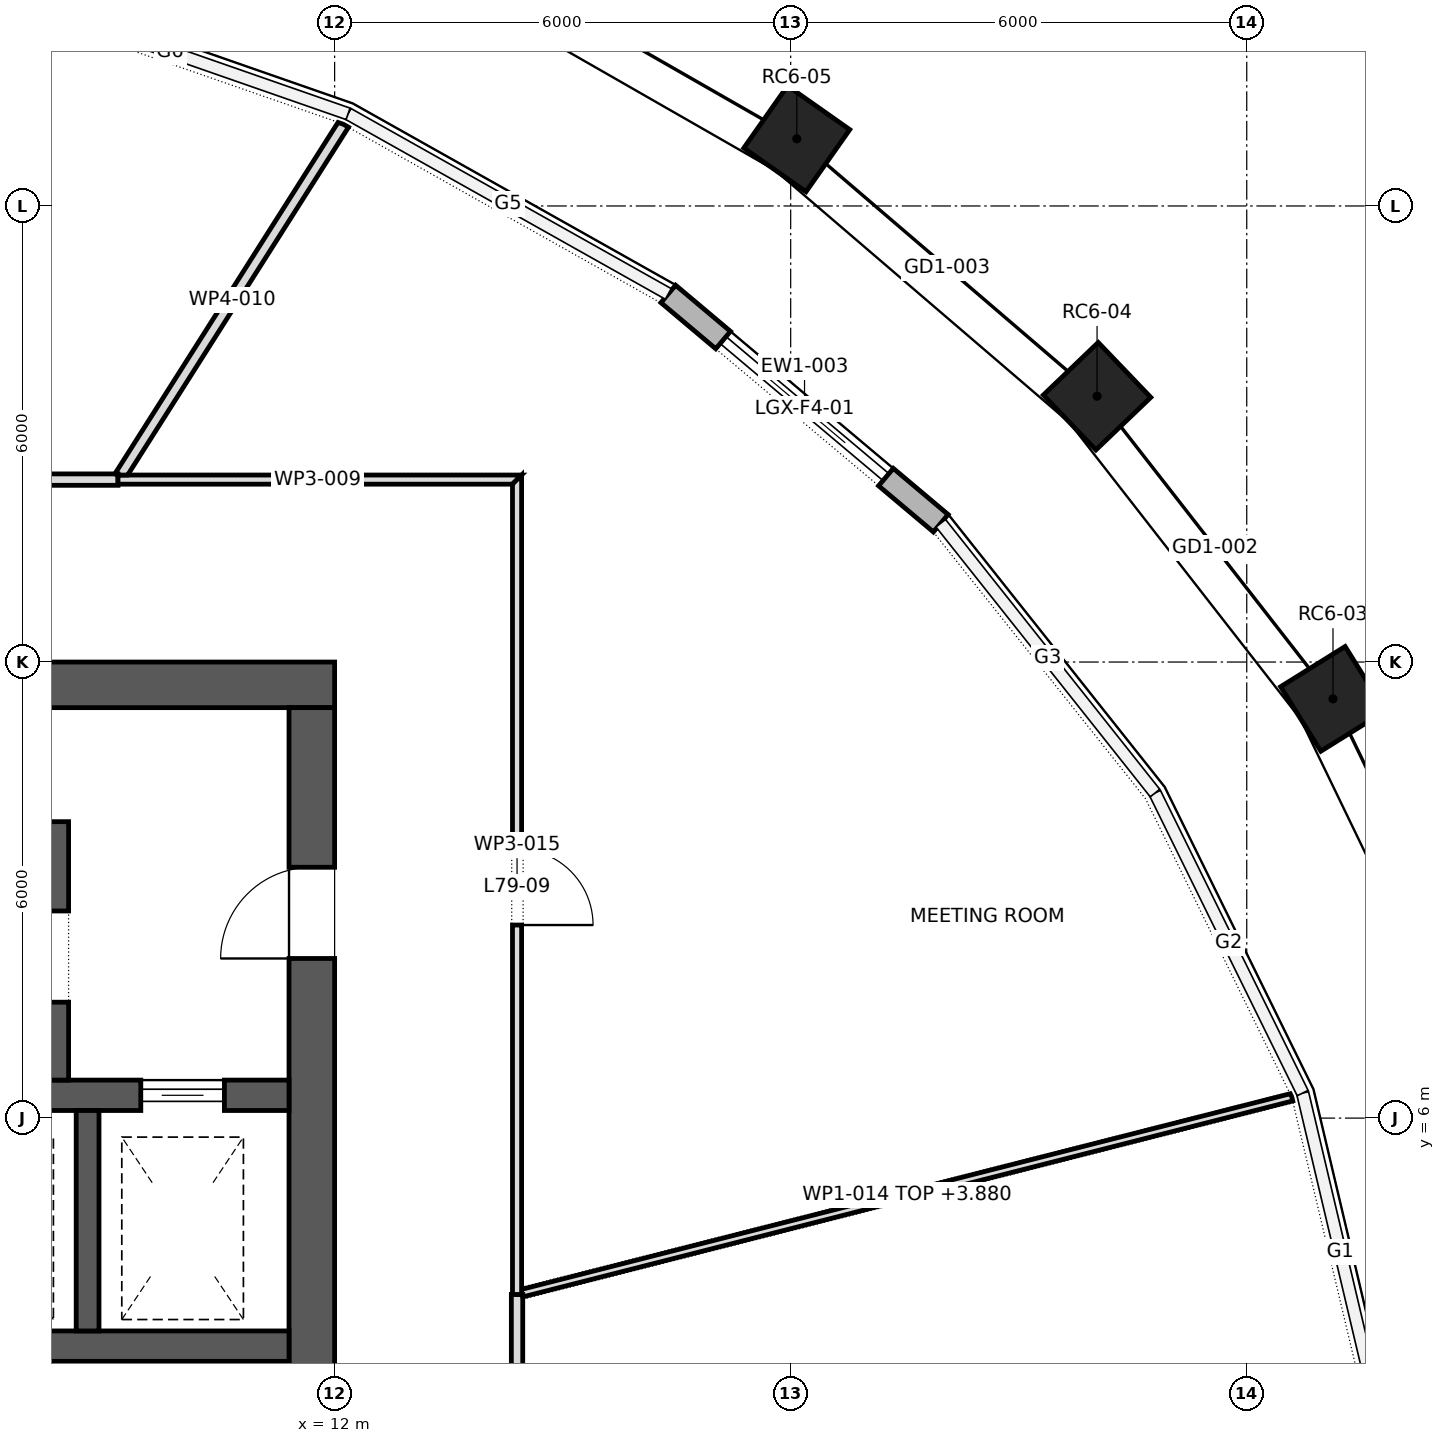
"""IFC4 building model, lengths in metres.
Left out: names, types, materials, properties, quantities, classifications, styles, units other than length and angle.
Written with IfcOpenShell. Run it as: python <this file> out.ifc"""

import sys

from ifc_helpers import new_model, si_unit, direction, frame, frame_2d, origin, origin_2d, place, context, subcontext, project, spatial, polyline, rectangle, outline, extrude, element, fill, save


model = new_model("IFC4")
c1 = context("Model", 3, precision=1e-05, world=origin(), true_north=direction((0.0, 1.0)))
c2 = subcontext(c1, "Body", "Model", "MODEL_VIEW")
j1 = project(units=[si_unit("LENGTHUNIT", "METRE"), si_unit("PLANEANGLEUNIT", "RADIAN")], contexts=[c1])
p1 = place(None, origin())
s1 = spatial("IfcSite", under=j1, at=p1, CompositionType="ELEMENT")
p2 = place(p1, origin())
s2 = spatial("IfcBuilding", under=s1, at=p2, CompositionType="ELEMENT")
p3 = place(p2, frame((0.0, 0.0, 338.3)))
s3 = spatial("IfcBuildingStorey", under=s2, at=p3, CompositionType="ELEMENT", Elevation=338.3)
for number, where, z_axis, x_axis in (
    (1, (25.135, 11.516, 0.0), (0.0, 0.0, 1.0), (-0.529, 0.849, 0.0)),
    (2, (22.031, 15.497, 0.0), (0.0, 0.0, 1.0), (-0.692, 0.722, 0.0)),
    (3, (18.08, 18.884, 0.0), (0.0, 0.0, 1.0), (-0.818, 0.575, 0.0)),
):
    element("IfcColumn", number, at=place(p3, frame(where, z_axis=z_axis, x_axis=x_axis)), inside=s3, PredefinedType="COLUMN", context=c2, shape_type="SweptSolid", body=[
        extrude(rectangle(XDim=1.0, YDim=1.0, at=origin_2d()), origin(), (0.0, 0.0, 1.0), 5.0),
    ])
p4 = place(p3, frame((-12.0, 11.7, 0.0), z_axis=(0.0, 0.0, 1.0), x_axis=(1.0, 0.0, 0.0)))
e4 = element("IfcWall", 4, at=p4, inside=s3, PredefinedType="SHEAR", context=c2, shape_type="SweptSolid", body=[
    extrude(rectangle(XDim=24.0, YDim=0.6, at=frame_2d((12.0, 0.0))), origin(), (0.0, 0.0, 1.0), 5.0),
])
p5 = place(p4, frame((9.025, 0.0, 0.0)))
e5 = element("IfcOpeningElement", 5, at=p5, cuts=e4, PredefinedType="OPENING", context=c2, shape_type="SweptSolid", body=[
    extrude(rectangle(XDim=0.9, YDim=2.1, at=frame_2d((0.45, 1.05))), frame((0.0, 0.312, 0.0), z_axis=(0.0, -1.0, 0.0), x_axis=(1.0, 0.0, 0.0)), (0.0, 0.0, 1.0), 0.624),
])
p6 = place(p4, frame((10.675, 0.0, 0.0)))
e6 = element("IfcOpeningElement", 6, at=p6, cuts=e4, PredefinedType="OPENING", context=c2, shape_type="SweptSolid", body=[
    extrude(rectangle(XDim=0.9, YDim=2.1, at=frame_2d((0.45, 1.05))), frame((0.0, 0.312, 0.0), z_axis=(0.0, -1.0, 0.0), x_axis=(1.0, 0.0, 0.0)), (0.0, 0.0, 1.0), 0.624),
])
p7 = place(p4, frame((4.6, 0.0, 0.0)))
e7 = element("IfcOpeningElement", 7, at=p7, cuts=e4, PredefinedType="OPENING", context=c2, shape_type="SweptSolid", body=[
    extrude(rectangle(XDim=0.8, YDim=2.1, at=frame_2d((0.4, 1.05))), frame((0.0, 0.312, 0.0), z_axis=(0.0, -1.0, 0.0), x_axis=(1.0, 0.0, 0.0)), (0.0, 0.0, 1.0), 0.624),
])
p8 = place(p4, frame((7.0, 0.0, 0.0)))
e8 = element("IfcOpeningElement", 8, at=p8, cuts=e4, PredefinedType="OPENING", context=c2, shape_type="SweptSolid", body=[
    extrude(rectangle(XDim=0.8, YDim=2.1, at=frame_2d((0.4, 1.05))), frame((0.0, 0.312, 0.0), z_axis=(0.0, -1.0, 0.0), x_axis=(1.0, 0.0, 0.0)), (0.0, 0.0, 1.0), 0.624),
])
p9 = place(p4, frame((15.85, 0.0, 0.0)))
e9 = element("IfcOpeningElement", 9, at=p9, cuts=e4, PredefinedType="OPENING", context=c2, shape_type="SweptSolid", body=[
    extrude(rectangle(XDim=0.8, YDim=2.1, at=frame_2d((0.4, 1.05))), frame((0.0, 0.312, 0.0), z_axis=(0.0, -1.0, 0.0), x_axis=(1.0, 0.0, 0.0)), (0.0, 0.0, 1.0), 0.624),
])
p10 = place(p3, frame((11.7, -11.4, 0.0), z_axis=(0.0, 0.0, 1.0), x_axis=(0.0, 1.0, 0.0)))
e10 = element("IfcWall", 10, at=p10, inside=s3, PredefinedType="SHEAR", context=c2, shape_type="SweptSolid", body=[
    extrude(rectangle(XDim=22.8, YDim=0.6, at=frame_2d((11.4, 0.0))), origin(), (0.0, 0.0, 1.0), 5.0),
])
p11 = place(p10, frame((10.2, 0.0, 0.0)))
e11 = element("IfcOpeningElement", 11, at=p11, cuts=e10, PredefinedType="OPENING", context=c2, shape_type="SweptSolid", body=[
    extrude(rectangle(XDim=2.4, YDim=2.1, at=frame_2d((1.2, 1.05))), frame((0.0, 0.312, 0.0), z_axis=(0.0, -1.0, 0.0), x_axis=(1.0, 0.0, 0.0)), (0.0, 0.0, 1.0), 0.624),
])
p12 = place(p10, frame((19.5, 0.0, 0.0)))
e12 = element("IfcOpeningElement", 12, at=p12, cuts=e10, PredefinedType="OPENING", context=c2, shape_type="SweptSolid", body=[
    extrude(rectangle(XDim=1.2, YDim=2.1, at=frame_2d((0.6, 1.05))), frame((0.0, 0.312, 0.0), z_axis=(0.0, -1.0, 0.0), x_axis=(1.0, 0.0, 0.0)), (0.0, 0.0, 1.0), 0.624),
])
p13 = place(p10, frame((2.1, 0.0, 0.0)))
e13 = element("IfcOpeningElement", 13, at=p13, cuts=e10, PredefinedType="OPENING", context=c2, shape_type="SweptSolid", body=[
    extrude(rectangle(XDim=1.2, YDim=2.1, at=frame_2d((0.6, 1.05))), frame((0.0, 0.312, 0.0), z_axis=(0.0, -1.0, 0.0), x_axis=(1.0, 0.0, 0.0)), (0.0, 0.0, 1.0), 0.624),
])
p14 = place(p3, frame((-11.4, 3.0, 0.0), z_axis=(0.0, 0.0, 1.0), x_axis=(1.0, 0.0, 0.0)))
e14 = element("IfcWall", 14, at=p14, inside=s3, PredefinedType="SHEAR", context=c2, shape_type="SweptSolid", body=[
    extrude(rectangle(XDim=22.8, YDim=0.4, at=frame_2d((11.4, 0.0))), origin(), (0.0, 0.0, 1.0), 5.0),
])
p15 = place(p14, frame((18.35, 0.0, 0.0)))
e15 = element("IfcOpeningElement", 15, at=p15, cuts=e14, PredefinedType="OPENING", context=c2, shape_type="SweptSolid", body=[
    extrude(rectangle(XDim=1.1, YDim=2.1, at=frame_2d((0.55, 1.05))), frame((0.0, 0.212, 0.0), z_axis=(0.0, -1.0, 0.0), x_axis=(1.0, 0.0, 0.0)), (0.0, 0.0, 1.0), 0.424),
])
p16 = place(p14, frame((13.788, 0.0, 0.0)))
e16 = element("IfcOpeningElement", 16, at=p16, cuts=e14, PredefinedType="OPENING", context=c2, shape_type="SweptSolid", body=[
    extrude(rectangle(XDim=0.9, YDim=2.1, at=frame_2d((0.45, 1.05))), frame((0.0, 0.212, 0.0), z_axis=(0.0, -1.0, 0.0), x_axis=(1.0, 0.0, 0.0)), (0.0, 0.0, 1.0), 0.424),
])
p17 = place(p14, frame((16.212, 0.0, 0.0)))
e17 = element("IfcOpeningElement", 17, at=p17, cuts=e14, PredefinedType="OPENING", context=c2, shape_type="SweptSolid", body=[
    extrude(rectangle(XDim=0.9, YDim=2.1, at=frame_2d((0.45, 1.05))), frame((0.0, 0.212, 0.0), z_axis=(0.0, -1.0, 0.0), x_axis=(1.0, 0.0, 0.0)), (0.0, 0.0, 1.0), 0.424),
])
p18 = place(p14, frame((5.95, 0.0, 0.0)))
e18 = element("IfcOpeningElement", 18, at=p18, cuts=e14, PredefinedType="OPENING", context=c2, shape_type="SweptSolid", body=[
    extrude(rectangle(XDim=0.9, YDim=2.1, at=frame_2d((0.45, 1.05))), frame((0.0, 0.212, 0.0), z_axis=(0.0, -1.0, 0.0), x_axis=(1.0, 0.0, 0.0)), (0.0, 0.0, 1.0), 0.424),
])
p19 = place(p3, frame((-11.4, 6.3, 0.0), z_axis=(0.0, 0.0, 1.0), x_axis=(1.0, 0.0, 0.0)))
e19 = element("IfcWall", 19, at=p19, inside=s3, PredefinedType="SHEAR", context=c2, shape_type="SweptSolid", body=[
    extrude(rectangle(XDim=22.8, YDim=0.4, at=frame_2d((11.4, 0.0))), origin(), (0.0, 0.0, 1.0), 5.0),
])
p20 = place(p19, frame((20.85, 0.0, 0.0)))
e20 = element("IfcOpeningElement", 20, at=p20, cuts=e19, PredefinedType="OPENING", context=c2, shape_type="SweptSolid", body=[
    extrude(rectangle(XDim=1.1, YDim=2.1, at=frame_2d((0.55, 1.05))), frame((0.0, 0.212, 0.0), z_axis=(0.0, -1.0, 0.0), x_axis=(1.0, 0.0, 0.0)), (0.0, 0.0, 1.0), 0.424),
])
p21 = place(p3, frame((8.75, 3.2, 0.0), z_axis=(0.0, 0.0, 1.0), x_axis=(0.0, 1.0, 0.0)))
e21 = element("IfcWall", 21, at=p21, inside=s3, PredefinedType="SHEAR", context=c2, shape_type="SweptSolid", body=[
    extrude(rectangle(XDim=2.9, YDim=0.3, at=frame_2d((1.45, 0.0))), origin(), (0.0, 0.0, 1.0), 5.0),
])
p22 = place(p3, frame((19.975, 13.826, 0.0), z_axis=(0.0, 0.0, 1.0), x_axis=(-0.765128700347, 0.643877373344, 0.0)))
e22 = element("IfcWall", 22, at=p22, inside=s3, PredefinedType="STANDARD", context=c2, shape_type="SweptSolid", body=[
    extrude(outline(polyline([(0.0, -0.15), (4.686, -0.15), (4.686, 0.15), (0.0, 0.15), (0.0, -0.15)])), origin(), (0.0, 0.0, 1.0), 4.65),
])
p23 = place(p22, frame((0.943, 0.0, 0.0)))
e23 = element("IfcOpeningElement", 23, at=p23, cuts=e22, PredefinedType="OPENING", context=c2, shape_type="SweptSolid", body=[
    extrude(rectangle(XDim=2.8, YDim=4.2, at=frame_2d((1.4, 2.1))), frame((0.0, 0.162, 0.0), z_axis=(0.0, -1.0, 0.0), x_axis=(1.0, 0.0, 0.0)), (0.0, 0.0, 1.0), 0.324),
])
p24 = place(p3, frame((8.375, 6.5, 0.0), z_axis=(0.0, 0.0, 1.0), x_axis=(0.0, 1.0, 0.0)))
e24 = element("IfcWall", 24, at=p24, inside=s3, PredefinedType="SHEAR", context=c2, shape_type="SweptSolid", body=[
    extrude(rectangle(XDim=3.4, YDim=0.25, at=frame_2d((1.7, 0.0))), origin(), (0.0, 0.0, 1.0), 4.65),
])
p25 = place(p24, frame((1.025, 0.0, 0.0)))
e25 = element("IfcOpeningElement", 25, at=p25, cuts=e24, PredefinedType="OPENING", context=c2, shape_type="SweptSolid", body=[
    extrude(rectangle(XDim=1.2, YDim=2.1, at=frame_2d((0.6, 1.05))), frame((0.0, 0.137, 0.0), z_axis=(0.0, -1.0, 0.0), x_axis=(1.0, 0.0, 0.0)), (0.0, 0.0, 1.0), 0.274),
])
p26 = place(p3, frame((-14.475, 14.4, 0.0), z_axis=(0.0, 0.0, 1.0), x_axis=(1.0, 0.0, 0.0)))
e26 = element("IfcWall", 26, at=p26, inside=s3, PredefinedType="PARTITIONING", context=c2, shape_type="SweptSolid", body=[
    extrude(outline(polyline([(23.625, 0.075), (21.656, 0.075), (19.688, 0.075), (17.719, 0.075), (15.75, 0.075), (13.781, 0.075), (11.812, 0.075), (9.844, 0.075), (7.875, 0.075), (5.906, 0.075), (3.938, 0.075), (1.969, 0.075), (0.0, 0.075), (0.15, -0.075), (2.106, -0.075), (4.062, -0.075), (6.019, -0.075), (7.975, -0.075), (9.931, -0.075), (11.888, -0.075), (13.844, -0.075), (15.8, -0.075), (17.756, -0.075), (19.712, -0.075), (21.669, -0.075), (23.625, -0.075), (23.625, 0.075)])), origin(), (0.0, 0.0, 1.0), 4.65),
])
p27 = place(p26, frame((10.95, 0.0, 0.0)))
e27 = element("IfcOpeningElement", 27, at=p27, cuts=e26, PredefinedType="OPENING", context=c2, shape_type="SweptSolid", body=[
    extrude(rectangle(XDim=1.8, YDim=2.1, at=frame_2d((0.9, 1.05))), frame((0.0, 0.087, 0.0), z_axis=(0.0, -1.0, 0.0), x_axis=(1.0, 0.0, 0.0)), (0.0, 0.0, 1.0), 0.174),
])
p28 = place(p3, frame((9.15, 14.4, 0.0), z_axis=(0.0, 0.0, 1.0), x_axis=(1.0, 0.0, 0.0)))
e28 = element("IfcWall", 28, at=p28, inside=s3, PredefinedType="PARTITIONING", context=c2, shape_type="SweptSolid", body=[
    extrude(outline(polyline([(0.0, -0.06), (1.73, -0.06), (3.46, -0.06), (5.19, -0.06), (5.31, 0.06), (3.54, 0.06), (1.77, 0.06), (0.0, 0.06), (0.0, -0.06)])), origin(), (0.0, 0.0, 1.0), 4.65),
])
p29 = place(p3, frame((12.119, 19.077, 0.0), z_axis=(0.0, 0.0, 1.0), x_axis=(-0.536016173419, -0.844207712493, 0.0)))
e29 = element("IfcWall", 29, at=p29, inside=s3, PredefinedType="PARTITIONING", context=c2, shape_type="SweptSolid", body=[
    extrude(outline(polyline([(5.499, -0.075), (5.499, -0.075), (5.477, -0.04), (5.489, -0.032), (5.472, -0.006), (5.472, -0.006), (5.421, 0.075), (3.614, 0.075), (1.807, 0.075), (0.0, 0.075), (0.004, -0.003), (0.021, -0.075), (1.847, -0.075), (3.673, -0.075), (5.499, -0.075)])), origin(), (0.0, 0.0, 1.0), 4.65),
])
p30 = place(p3, frame((14.4, -14.475, 0.0), z_axis=(0.0, 0.0, 1.0), x_axis=(0.0, 1.0, 0.0)))
e30 = element("IfcWall", 30, at=p30, inside=s3, PredefinedType="PARTITIONING", context=c2, shape_type="SweptSolid", body=[
    extrude(outline(polyline([(18.155, 0.075), (16.354, 0.075), (14.554, 0.075), (12.754, 0.075), (10.953, 0.075), (9.153, 0.075), (7.352, 0.075), (5.552, 0.075), (3.751, 0.075), (1.951, 0.075), (0.15, 0.075), (0.0, -0.075), (1.816, -0.075), (3.631, -0.075), (5.447, -0.075), (7.262, -0.075), (9.078, -0.075), (10.893, -0.075), (12.708, -0.075), (14.524, -0.075), (16.34, -0.075), (18.155, -0.075), (18.155, 0.075)])), origin(), (0.0, 0.0, 1.0), 4.65),
])
p31 = place(p30, frame((8.405, 0.0, 0.0)))
e31 = element("IfcOpeningElement", 31, at=p31, cuts=e30, PredefinedType="OPENING", context=c2, shape_type="SweptSolid", body=[
    extrude(rectangle(XDim=1.0, YDim=2.1, at=frame_2d((0.5, 1.05))), frame((0.0, 0.087, 0.0), z_axis=(0.0, -1.0, 0.0), x_axis=(1.0, 0.0, 0.0)), (0.0, 0.0, 1.0), 0.174),
])
p32 = place(p30, frame((15.22, 0.0, 0.0)))
e32 = element("IfcOpeningElement", 32, at=p32, cuts=e30, PredefinedType="OPENING", context=c2, shape_type="SweptSolid", body=[
    extrude(rectangle(XDim=1.0, YDim=2.1, at=frame_2d((0.5, 1.05))), frame((0.0, 0.087, 0.0), z_axis=(0.0, -1.0, 0.0), x_axis=(1.0, 0.0, 0.0)), (0.0, 0.0, 1.0), 0.174),
])
p33 = place(p3, frame((14.463, 3.696, 0.0), z_axis=(0.0, 0.0, 1.0), x_axis=(0.969103365917, 0.246654953667, 0.0)))
e33 = element("IfcWall", 33, at=p33, inside=s3, PredefinedType="PARTITIONING", context=c2, shape_type="SweptSolid", body=[
    extrude(outline(polyline([(10.453, -0.05), (10.453, 0.009), (10.445, 0.05), (8.706, 0.05), (6.966, 0.05), (5.227, 0.05), (3.488, 0.05), (1.749, 0.05), (0.01, 0.05), (0.0, 0.012), (0.0, -0.017), (0.008, -0.019), (0.0, -0.049), (0.0, -0.05), (1.742, -0.05), (3.484, -0.05), (5.227, -0.05), (6.969, -0.05), (8.711, -0.05), (10.453, -0.05)])), origin(), (0.0, 0.0, 1.0), 3.88),
])
p34 = place(p3, frame((14.4, 14.46, 0.0), z_axis=(0.0, 0.0, 1.0), x_axis=(0.0, -1.0, 0.0)))
e34 = element("IfcWall", 34, at=p34, inside=s3, PredefinedType="PARTITIONING", context=c2, shape_type="SweptSolid", body=[
    extrude(outline(polyline([(10.78, 0.06), (8.983, 0.06), (7.187, 0.06), (5.39, 0.06), (3.593, 0.06), (1.797, 0.06), (0.0, 0.06), (0.12, -0.06), (1.897, -0.06), (3.673, -0.06), (5.45, -0.06), (7.227, -0.06), (9.003, -0.06), (10.78, -0.06), (10.78, 0.06)])), origin(), (0.0, 0.0, 1.0), 4.65),
])
p35 = place(p34, frame((4.92, 0.0, 0.0)))
e35 = element("IfcOpeningElement", 35, at=p35, cuts=e34, PredefinedType="OPENING", context=c2, shape_type="SweptSolid", body=[
    extrude(rectangle(XDim=1.0, YDim=2.1, at=frame_2d((0.5, 1.05))), frame((0.0, 0.072, 0.0), z_axis=(0.0, -1.0, 0.0), x_axis=(1.0, 0.0, 0.0)), (0.0, 0.0, 1.0), 0.144),
])
p36 = place(p23, origin())
e36 = element("IfcDoor", 36, at=p36, inside=s3, OperationType="DOUBLE_DOOR_SLIDING", PredefinedType="DOOR", context=c2, shape_type="SweptSolid", body=[
    extrude(rectangle(XDim=2.8, YDim=4.2, at=frame_2d((1.4, 2.1))), frame((0.0, 0.025, 0.0), z_axis=(0.0, -1.0, 0.0), x_axis=(1.0, 0.0, 0.0)), (0.0, 0.0, 1.0), 0.05),
])
fill(e23, e36)
p37 = place(p20, origin())
e37 = element("IfcDoor", 37, at=p37, inside=s3, OperationType="SLIDING_TO_LEFT", PredefinedType="DOOR", context=c2, shape_type="SweptSolid", body=[
    extrude(rectangle(XDim=1.1, YDim=2.1, at=frame_2d((0.55, 1.05))), frame((0.0, 0.025, 0.0), z_axis=(0.0, -1.0, 0.0), x_axis=(1.0, 0.0, 0.0)), (0.0, 0.0, 1.0), 0.05),
])
fill(e20, e37)
p38 = place(p25, origin())
e38 = element("IfcDoor", 38, at=p38, inside=s3, OperationType="SINGLE_SWING_RIGHT", PredefinedType="DOOR", context=c2, shape_type="SweptSolid", body=[
    extrude(rectangle(XDim=1.2, YDim=2.1, at=frame_2d((0.6, 1.05))), frame((0.0, 0.025, 0.0), z_axis=(0.0, -1.0, 0.0), x_axis=(1.0, 0.0, 0.0)), (0.0, 0.0, 1.0), 0.05),
])
fill(e25, e38)
p39 = place(p12, origin())
e39 = element("IfcDoor", 39, at=p39, inside=s3, OperationType="SINGLE_SWING_RIGHT", PredefinedType="DOOR", context=c2, shape_type="SweptSolid", body=[
    extrude(rectangle(XDim=1.2, YDim=2.1, at=frame_2d((0.6, 1.05))), frame((0.0, 0.025, 0.0), z_axis=(0.0, -1.0, 0.0), x_axis=(1.0, 0.0, 0.0)), (0.0, 0.0, 1.0), 0.05),
])
fill(e12, e39)
p40 = place(p35, origin())
e40 = element("IfcDoor", 40, at=p40, inside=s3, OperationType="SINGLE_SWING_LEFT", PredefinedType="DOOR", context=c2, shape_type="SweptSolid", body=[
    extrude(rectangle(XDim=1.0, YDim=2.1, at=frame_2d((0.5, 1.05))), frame((0.0, 0.025, 0.0), z_axis=(0.0, -1.0, 0.0), x_axis=(1.0, 0.0, 0.0)), (0.0, 0.0, 1.0), 0.05),
])
fill(e35, e40)
save(model, sys.argv[1])
